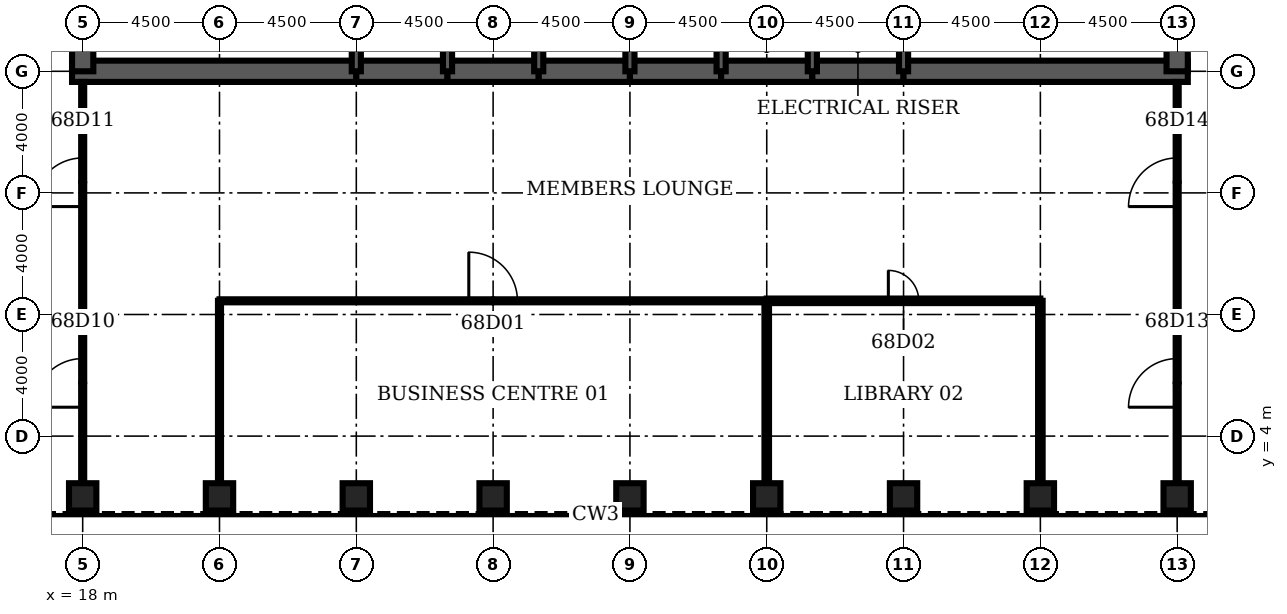
"""IFC4 building model, lengths in metres.
Left out: names, types, materials, properties, quantities, classifications, styles, units other than length and angle.
Written with IfcOpenShell. Run it as: python <this file> out.ifc"""

import sys

from ifc_helpers import new_model, si_unit, direction, frame, frame_2d, origin, origin_2d, place, context, subcontext, project, spatial, rectangle, hollow_rectangle, extrude, element, fill, save


model = new_model("IFC4")
c1 = context("Model", 3, precision=1e-05, world=origin(), true_north=direction((0.0, 1.0)))
c2 = subcontext(c1, "Body", "Model", "MODEL_VIEW")
j1 = project(units=[si_unit("LENGTHUNIT", "METRE"), si_unit("PLANEANGLEUNIT", "RADIAN")], contexts=[c1])
p1 = place(None, origin())
s1 = spatial("IfcSite", under=j1, at=p1, CompositionType="ELEMENT")
p2 = place(p1, origin())
s2 = spatial("IfcBuilding", under=s1, at=p2, CompositionType="ELEMENT")
p3 = place(p2, frame((0.0, 0.0, 300.5)))
s3 = spatial("IfcBuildingStorey", under=s2, at=p3, CompositionType="ELEMENT", Elevation=300.5)
for number, where, z_axis, x_axis in (
    (1, (18.0, 2.0, 0.0), (0.0, 0.0, 1.0), (0.0, 1.0, 0.0)),
    (2, (22.5, 2.0, 0.0), (0.0, 0.0, 1.0), (0.0, 1.0, 0.0)),
    (3, (27.0, 2.0, 0.0), (0.0, 0.0, 1.0), (0.0, 1.0, 0.0)),
    (4, (31.5, 2.0, 0.0), (0.0, 0.0, 1.0), (0.0, 1.0, 0.0)),
    (5, (36.0, 2.0, 0.0), (0.0, 0.0, 1.0), (0.0, 1.0, 0.0)),
    (6, (40.5, 2.0, 0.0), (0.0, 0.0, 1.0), (0.0, 1.0, 0.0)),
    (7, (45.0, 2.0, 0.0), (0.0, 0.0, 1.0), (0.0, 1.0, 0.0)),
    (8, (49.5, 2.0, 0.0), (0.0, 0.0, 1.0), (0.0, 1.0, 0.0)),
    (9, (54.0, 2.0, 0.0), (0.0, 0.0, 1.0), (0.0, 1.0, 0.0)),
):
    element("IfcColumn", number, at=place(p3, frame(where, z_axis=z_axis, x_axis=x_axis)), inside=s3, PredefinedType="COLUMN", context=c2, shape_type="SweptSolid", body=[
        extrude(hollow_rectangle(XDim=0.9, YDim=0.9, WallThickness=0.06, at=origin_2d()), origin(), (0.0, 0.0, 1.0), 4.2),
    ])
p4 = place(p3, frame((17.65, 16.0, 0.0), z_axis=(0.0, 0.0, 1.0), x_axis=(1.0, 0.0, 0.0)))
e10 = element("IfcWall", 10, at=p4, inside=s3, PredefinedType="SHEAR", context=c2, shape_type="SweptSolid", body=[
    extrude(rectangle(XDim=9.35, YDim=0.7, at=frame_2d((4.675, 0.0))), origin(), (0.0, 0.0, 1.0), 4.2),
])
for number, where, z_axis, x_axis in (
    (11, (27.0, 16.0, 0.0), (0.0, 0.0, 1.0), (1.0, 0.0, 0.0)),
    (12, (30.0, 16.0, 0.0), (0.0, 0.0, 1.0), (1.0, 0.0, 0.0)),
    (13, (33.0, 16.0, 0.0), (0.0, 0.0, 1.0), (1.0, 0.0, 0.0)),
    (14, (36.0, 16.0, 0.0), (0.0, 0.0, 1.0), (1.0, 0.0, 0.0)),
    (15, (39.0, 16.0, 0.0), (0.0, 0.0, 1.0), (1.0, 0.0, 0.0)),
    (16, (42.0, 16.0, 0.0), (0.0, 0.0, 1.0), (1.0, 0.0, 0.0)),
):
    element("IfcWall", number, at=place(p3, frame(where, z_axis=z_axis, x_axis=x_axis)), inside=s3, PredefinedType="SHEAR", context=c2, shape_type="SweptSolid", body=[
        extrude(rectangle(XDim=3.0, YDim=0.7, at=frame_2d((1.5, 0.0))), origin(), (0.0, 0.0, 1.0), 4.2),
    ])
p5 = place(p3, frame((45.0, 16.0, 0.0), z_axis=(0.0, 0.0, 1.0), x_axis=(1.0, 0.0, 0.0)))
e17 = element("IfcWall", 17, at=p5, inside=s3, PredefinedType="SHEAR", context=c2, shape_type="SweptSolid", body=[
    extrude(rectangle(XDim=9.35, YDim=0.7, at=frame_2d((4.675, 0.0))), origin(), (0.0, 0.0, 1.0), 4.2),
])
for number, where, z_axis, x_axis in (
    (18, (18.0, 19.2, 0.0), (0.0, 0.0, 1.0), (0.0, -1.0, 0.0)),
    (19, (54.0, 16.0, 0.0), (0.0, 0.0, 1.0), (0.0, 1.0, 0.0)),
):
    element("IfcWall", number, at=place(p3, frame(where, z_axis=z_axis, x_axis=x_axis)), inside=s3, PredefinedType="SHEAR", context=c2, shape_type="SweptSolid", body=[
        extrude(rectangle(XDim=3.2, YDim=0.7, at=frame_2d((1.6, 0.0))), origin(), (0.0, 0.0, 1.0), 4.2),
    ])
for number, where, z_axis, x_axis in (
    (20, (27.0, 16.0, 0.0), (0.0, 0.0, 1.0), (0.0, 1.0, 0.0)),
    (21, (30.0, 16.0, 0.0), (0.0, 0.0, 1.0), (0.0, 1.0, 0.0)),
    (22, (33.0, 16.0, 0.0), (0.0, 0.0, 1.0), (0.0, 1.0, 0.0)),
    (23, (36.0, 16.0, 0.0), (0.0, 0.0, 1.0), (0.0, 1.0, 0.0)),
    (24, (39.0, 16.0, 0.0), (0.0, 0.0, 1.0), (0.0, 1.0, 0.0)),
    (25, (42.0, 16.0, 0.0), (0.0, 0.0, 1.0), (0.0, 1.0, 0.0)),
    (26, (45.0, 16.0, 0.0), (0.0, 0.0, 1.0), (0.0, 1.0, 0.0)),
):
    element("IfcWall", number, at=place(p3, frame(where, z_axis=z_axis, x_axis=x_axis)), inside=s3, PredefinedType="SOLIDWALL", context=c2, shape_type="SweptSolid", body=[
        extrude(rectangle(XDim=3.2, YDim=0.3, at=frame_2d((1.6, 0.0))), origin(), (0.0, 0.0, 1.0), 4.2),
    ])
p6 = place(p3, frame((22.5, 8.45, 0.0), z_axis=(0.0, 0.0, 1.0), x_axis=(1.0, 0.0, 0.0)))
e27 = element("IfcWall", 27, at=p6, inside=s3, PredefinedType="PARTITIONING", context=c2, shape_type="SweptSolid", body=[
    extrude(rectangle(XDim=18.0, YDim=0.1, at=frame_2d((9.0, 0.0))), origin(), (0.0, 0.0, 1.0), 3.0),
])
p7 = place(p6, frame((8.2, 0.0, 0.0)))
e28 = element("IfcOpeningElement", 28, at=p7, cuts=e27, PredefinedType="OPENING", context=c2, shape_type="SweptSolid", body=[
    extrude(rectangle(XDim=1.6, YDim=2.1, at=frame_2d((0.8, 1.05))), frame((0.0, 0.06, 0.0), z_axis=(0.0, -1.0, 0.0), x_axis=(1.0, 0.0, 0.0)), (0.0, 0.0, 1.0), 0.12),
])
p8 = place(p3, frame((40.5, 8.45, 0.0), z_axis=(0.0, 0.0, 1.0), x_axis=(1.0, 0.0, 0.0)))
e29 = element("IfcWall", 29, at=p8, inside=s3, PredefinedType="PARTITIONING", context=c2, shape_type="SweptSolid", body=[
    extrude(rectangle(XDim=9.0, YDim=0.15, at=frame_2d((4.5, 0.0))), origin(), (0.0, 0.0, 1.0), 3.0),
])
p9 = place(p8, frame((4.0, 0.0, 0.0)))
e30 = element("IfcOpeningElement", 30, at=p9, cuts=e29, PredefinedType="OPENING", context=c2, shape_type="SweptSolid", body=[
    extrude(rectangle(XDim=1.0, YDim=2.1, at=frame_2d((0.5, 1.05))), frame((0.0, 0.085, 0.0), z_axis=(0.0, -1.0, 0.0), x_axis=(1.0, 0.0, 0.0)), (0.0, 0.0, 1.0), 0.17),
])
p10 = place(p3, frame((18.0, 2.45, 0.0), z_axis=(0.0, 0.0, 1.0), x_axis=(0.0, 1.0, 0.0)))
e31 = element("IfcWall", 31, at=p10, inside=s3, PredefinedType="PARTITIONING", context=c2, shape_type="SweptSolid", body=[
    extrude(rectangle(XDim=13.2, YDim=0.1, at=frame_2d((6.6, 0.0))), origin(), (0.0, 0.0, 1.0), 3.0),
])
p11 = place(p10, frame((2.5, 0.0, 0.0)))
e32 = element("IfcOpeningElement", 32, at=p11, cuts=e31, PredefinedType="OPENING", context=c2, shape_type="SweptSolid", body=[
    extrude(rectangle(XDim=1.6, YDim=2.1, at=frame_2d((0.8, 1.05))), frame((0.0, 0.06, 0.0), z_axis=(0.0, -1.0, 0.0), x_axis=(1.0, 0.0, 0.0)), (0.0, 0.0, 1.0), 0.12),
])
p12 = place(p10, frame((9.1, 0.0, 0.0)))
e33 = element("IfcOpeningElement", 33, at=p12, cuts=e31, PredefinedType="OPENING", context=c2, shape_type="SweptSolid", body=[
    extrude(rectangle(XDim=1.6, YDim=2.1, at=frame_2d((0.8, 1.05))), frame((0.0, 0.06, 0.0), z_axis=(0.0, -1.0, 0.0), x_axis=(1.0, 0.0, 0.0)), (0.0, 0.0, 1.0), 0.12),
])
p13 = place(p3, frame((22.5, 2.45, 0.0), z_axis=(0.0, 0.0, 1.0), x_axis=(0.0, 1.0, 0.0)))
e34 = element("IfcWall", 34, at=p13, inside=s3, PredefinedType="PARTITIONING", context=c2, shape_type="SweptSolid", body=[
    extrude(rectangle(XDim=6.0, YDim=0.1, at=frame_2d((3.0, 0.0))), origin(), (0.0, 0.0, 1.0), 3.0),
])
for number, where, z_axis, x_axis in (
    (35, (40.5, 2.45, 0.0), (0.0, 0.0, 1.0), (0.0, 1.0, 0.0)),
    (36, (49.5, 2.45, 0.0), (0.0, 0.0, 1.0), (0.0, 1.0, 0.0)),
):
    element("IfcWall", number, at=place(p3, frame(where, z_axis=z_axis, x_axis=x_axis)), inside=s3, PredefinedType="PARTITIONING", context=c2, shape_type="SweptSolid", body=[
        extrude(rectangle(XDim=6.0, YDim=0.15, at=frame_2d((3.0, 0.0))), origin(), (0.0, 0.0, 1.0), 3.0),
    ])
p14 = place(p3, frame((54.0, 2.45, 0.0), z_axis=(0.0, 0.0, 1.0), x_axis=(0.0, 1.0, 0.0)))
e37 = element("IfcWall", 37, at=p14, inside=s3, PredefinedType="PARTITIONING", context=c2, shape_type="SweptSolid", body=[
    extrude(rectangle(XDim=13.2, YDim=0.1, at=frame_2d((6.6, 0.0))), origin(), (0.0, 0.0, 1.0), 3.0),
])
p15 = place(p14, frame((2.5, 0.0, 0.0)))
e38 = element("IfcOpeningElement", 38, at=p15, cuts=e37, PredefinedType="OPENING", context=c2, shape_type="SweptSolid", body=[
    extrude(rectangle(XDim=1.6, YDim=2.1, at=frame_2d((0.8, 1.05))), frame((0.0, 0.06, 0.0), z_axis=(0.0, -1.0, 0.0), x_axis=(1.0, 0.0, 0.0)), (0.0, 0.0, 1.0), 0.12),
])
p16 = place(p14, frame((9.1, 0.0, 0.0)))
e39 = element("IfcOpeningElement", 39, at=p16, cuts=e37, PredefinedType="OPENING", context=c2, shape_type="SweptSolid", body=[
    extrude(rectangle(XDim=1.6, YDim=2.1, at=frame_2d((0.8, 1.05))), frame((0.0, 0.06, 0.0), z_axis=(0.0, -1.0, 0.0), x_axis=(1.0, 0.0, 0.0)), (0.0, 0.0, 1.0), 0.12),
])
p17 = place(p7, origin())
e40 = element("IfcDoor", 40, at=p17, inside=s3, OperationType="SINGLE_SWING_LEFT", PredefinedType="DOOR", context=c2, shape_type="SweptSolid", body=[
    extrude(rectangle(XDim=1.6, YDim=2.1, at=frame_2d((0.8, 1.05))), frame((0.0, 0.025, 0.0), z_axis=(0.0, -1.0, 0.0), x_axis=(1.0, 0.0, 0.0)), (0.0, 0.0, 1.0), 0.05),
])
fill(e28, e40)
p18 = place(p9, origin())
e41 = element("IfcDoor", 41, at=p18, inside=s3, OperationType="SINGLE_SWING_LEFT", PredefinedType="DOOR", context=c2, shape_type="SweptSolid", body=[
    extrude(rectangle(XDim=1.0, YDim=2.1, at=frame_2d((0.5, 1.05))), frame((0.0, 0.025, 0.0), z_axis=(0.0, -1.0, 0.0), x_axis=(1.0, 0.0, 0.0)), (0.0, 0.0, 1.0), 0.05),
])
fill(e30, e41)
p19 = place(p11, origin())
e42 = element("IfcDoor", 42, at=p19, inside=s3, OperationType="SINGLE_SWING_LEFT", PredefinedType="DOOR", context=c2, shape_type="SweptSolid", body=[
    extrude(rectangle(XDim=1.6, YDim=2.1, at=frame_2d((0.8, 1.05))), frame((0.0, 0.025, 0.0), z_axis=(0.0, -1.0, 0.0), x_axis=(1.0, 0.0, 0.0)), (0.0, 0.0, 1.0), 0.05),
])
fill(e32, e42)
p20 = place(p12, origin())
e43 = element("IfcDoor", 43, at=p20, inside=s3, OperationType="SINGLE_SWING_LEFT", PredefinedType="DOOR", context=c2, shape_type="SweptSolid", body=[
    extrude(rectangle(XDim=1.6, YDim=2.1, at=frame_2d((0.8, 1.05))), frame((0.0, 0.025, 0.0), z_axis=(0.0, -1.0, 0.0), x_axis=(1.0, 0.0, 0.0)), (0.0, 0.0, 1.0), 0.05),
])
fill(e33, e43)
p21 = place(p15, origin())
e44 = element("IfcDoor", 44, at=p21, inside=s3, OperationType="SINGLE_SWING_LEFT", PredefinedType="DOOR", context=c2, shape_type="SweptSolid", body=[
    extrude(rectangle(XDim=1.6, YDim=2.1, at=frame_2d((0.8, 1.05))), frame((0.0, 0.025, 0.0), z_axis=(0.0, -1.0, 0.0), x_axis=(1.0, 0.0, 0.0)), (0.0, 0.0, 1.0), 0.05),
])
fill(e38, e44)
p22 = place(p16, origin())
e45 = element("IfcDoor", 45, at=p22, inside=s3, OperationType="SINGLE_SWING_LEFT", PredefinedType="DOOR", context=c2, shape_type="SweptSolid", body=[
    extrude(rectangle(XDim=1.6, YDim=2.1, at=frame_2d((0.8, 1.05))), frame((0.0, 0.025, 0.0), z_axis=(0.0, -1.0, 0.0), x_axis=(1.0, 0.0, 0.0)), (0.0, 0.0, 1.0), 0.05),
])
fill(e39, e45)
save(model, sys.argv[1])
